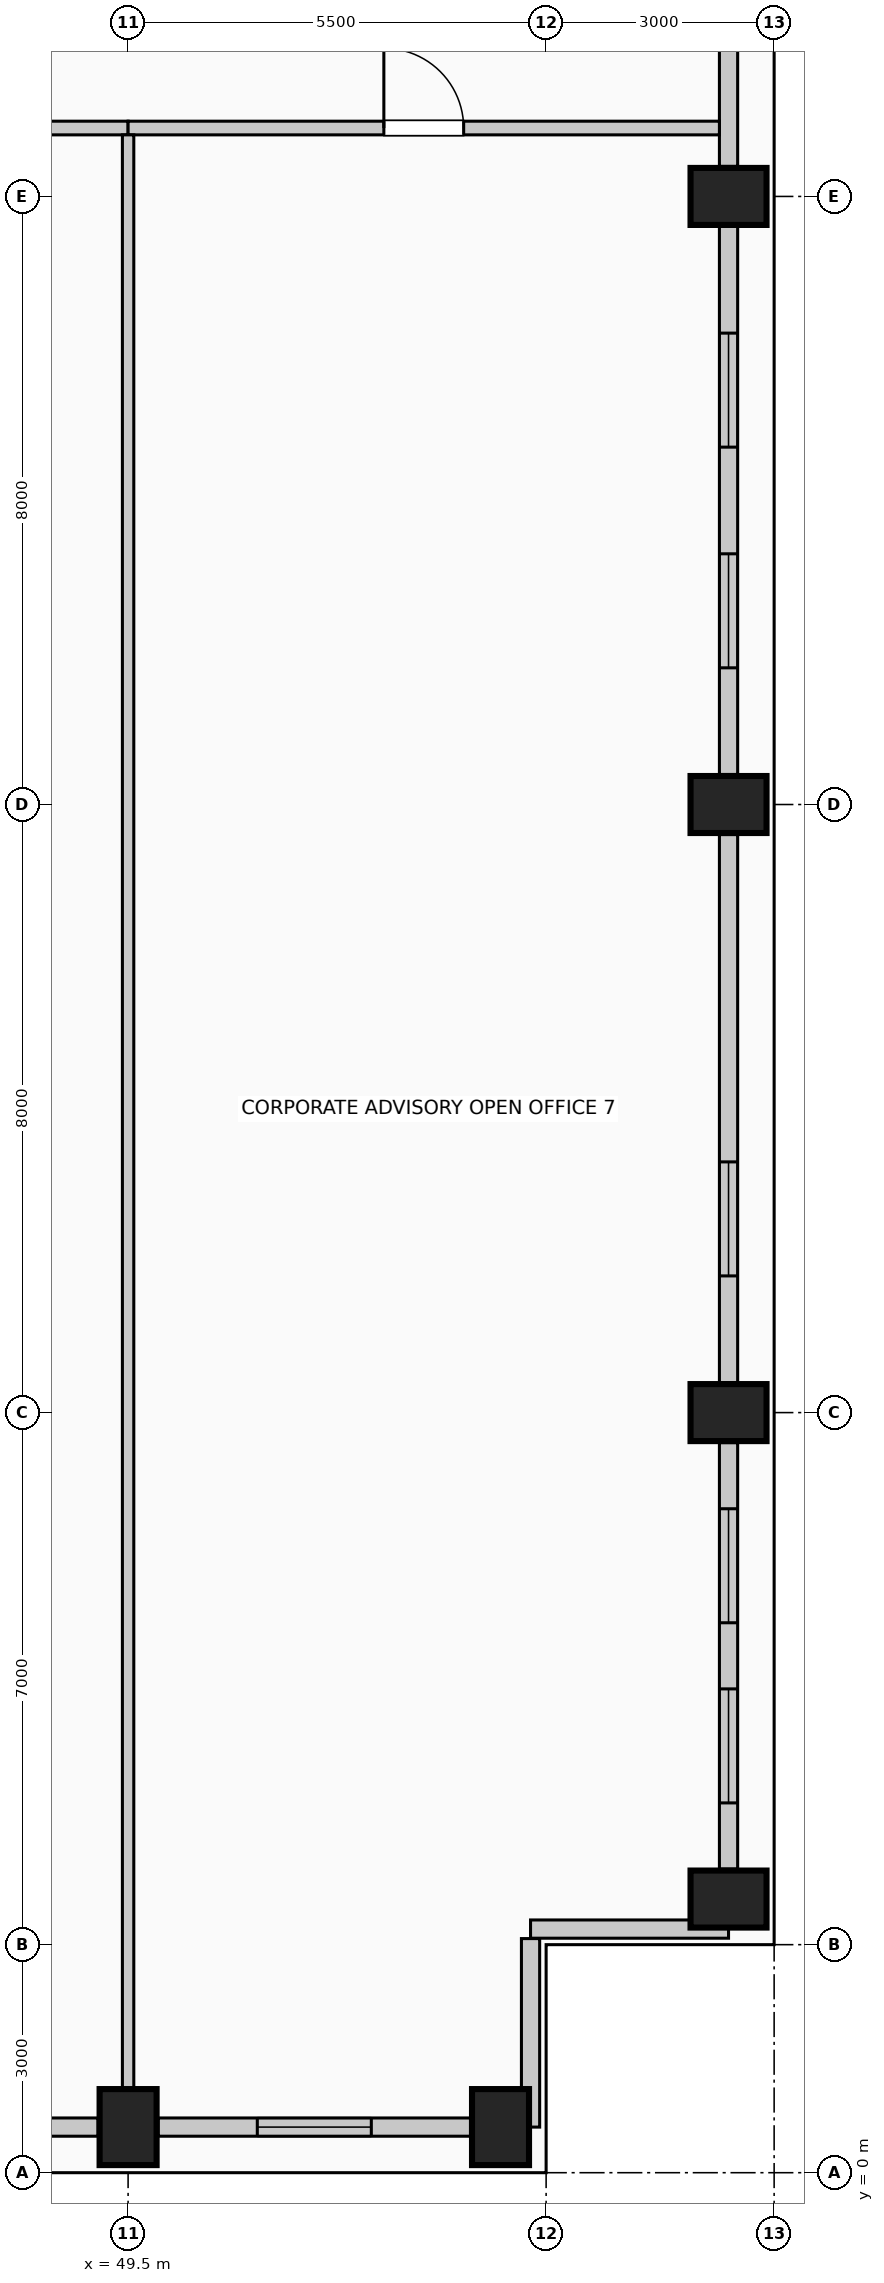
"""IFC4 building model, lengths in metres.
Left out: names, types, materials, properties, quantities, classifications, styles, units other than length and angle.
Written with IfcOpenShell. Run it as: python <this file> out.ifc"""

import sys

from ifc_helpers import new_model, si_unit, direction, frame, frame_2d, origin, origin_2d, place, context, subcontext, project, spatial, rectangle, extrude, element, fill, save


model = new_model("IFC4")
c1 = context("Model", 3, precision=1e-05, world=origin(), true_north=direction((0.0, 1.0)))
c2 = subcontext(c1, "Body", "Model", "MODEL_VIEW")
j1 = project(units=[si_unit("LENGTHUNIT", "METRE"), si_unit("PLANEANGLEUNIT", "RADIAN")], contexts=[c1])
p1 = place(None, origin())
s1 = spatial("IfcSite", under=j1, at=p1, CompositionType="ELEMENT")
p2 = place(p1, origin())
s2 = spatial("IfcBuilding", under=s1, at=p2, CompositionType="ELEMENT")
p3 = place(p2, frame((0.0, 0.0, 260.6)))
s3 = spatial("IfcBuildingStorey", under=s2, at=p3, CompositionType="ELEMENT", Elevation=260.6)
for number, where, z_axis, x_axis in (
    (1, (49.5, 0.6, 0.0), (0.0, 0.0, 1.0), (1.0, 0.0, 0.0)),
    (2, (54.4, 0.6, 0.0), (0.0, 0.0, 1.0), (1.0, 0.0, 0.0)),
    (3, (57.4, 3.6, 0.0), (0.0, 0.0, 1.0), (0.0, 1.0, 0.0)),
    (4, (57.4, 10.0, 0.0), (0.0, 0.0, 1.0), (0.0, 1.0, 0.0)),
    (5, (57.4, 18.0, 0.0), (0.0, 0.0, 1.0), (0.0, 1.0, 0.0)),
    (6, (57.4, 26.0, 0.0), (0.0, 0.0, 1.0), (0.0, 1.0, 0.0)),
):
    element("IfcColumn", number, at=place(p3, frame(where, z_axis=z_axis, x_axis=x_axis)), inside=s3, PredefinedType="COLUMN", context=c2, shape_type="SweptSolid", body=[
        extrude(rectangle(XDim=0.75, YDim=1.0, at=origin_2d()), origin(), (0.0, 0.0, 1.0), 4.0),
    ])
p4 = place(p3, frame((49.105, 0.6, 0.0), z_axis=(0.0, 0.0, 1.0), x_axis=(-1.0, 0.0, 0.0)))
e7 = element("IfcWall", 7, at=p4, inside=s3, PredefinedType="SOLIDWALL", context=c2, shape_type="SweptSolid", body=[
    extrude(rectangle(XDim=4.71, YDim=0.24, at=frame_2d((2.355, 0.0))), origin(), (0.0, 0.0, 1.0), 3.0),
])
p5 = place(p3, frame((54.005, 0.6, 0.0), z_axis=(0.0, 0.0, 1.0), x_axis=(-1.0, 0.0, 0.0)))
e8 = element("IfcWall", 8, at=p5, inside=s3, PredefinedType="SOLIDWALL", context=c2, shape_type="SweptSolid", body=[
    extrude(rectangle(XDim=4.11, YDim=0.24, at=frame_2d((2.055, 0.0))), origin(), (0.0, 0.0, 1.0), 3.0),
])
p6 = place(p5, frame((1.305, 0.0, 0.42)))
e9 = element("IfcOpeningElement", 9, at=p6, cuts=e8, PredefinedType="OPENING", context=c2, shape_type="SweptSolid", body=[
    extrude(rectangle(XDim=1.5, YDim=2.2, at=frame_2d((0.75, 1.1))), frame((0.0, 0.13, 0.0), z_axis=(0.0, -1.0, 0.0), x_axis=(1.0, 0.0, 0.0)), (0.0, 0.0, 1.0), 0.26),
])
p7 = place(p3, frame((57.4, 9.605, 0.0), z_axis=(0.0, 0.0, 1.0), x_axis=(0.0, -1.0, 0.0)))
e10 = element("IfcWall", 10, at=p7, inside=s3, PredefinedType="SOLIDWALL", context=c2, shape_type="SweptSolid", body=[
    extrude(rectangle(XDim=5.61, YDim=0.24, at=frame_2d((2.805, 0.0))), origin(), (0.0, 0.0, 1.0), 3.0),
])
p8 = place(p7, frame((0.87, 0.0, 0.42)))
e11 = element("IfcOpeningElement", 11, at=p8, cuts=e10, PredefinedType="OPENING", context=c2, shape_type="SweptSolid", body=[
    extrude(rectangle(XDim=1.5, YDim=2.2, at=frame_2d((0.75, 1.1))), frame((0.0, 0.13, 0.0), z_axis=(0.0, -1.0, 0.0), x_axis=(1.0, 0.0, 0.0)), (0.0, 0.0, 1.0), 0.26),
])
p9 = place(p7, frame((3.24, 0.0, 0.42)))
e12 = element("IfcOpeningElement", 12, at=p9, cuts=e10, PredefinedType="OPENING", context=c2, shape_type="SweptSolid", body=[
    extrude(rectangle(XDim=1.5, YDim=2.2, at=frame_2d((0.75, 1.1))), frame((0.0, 0.13, 0.0), z_axis=(0.0, -1.0, 0.0), x_axis=(1.0, 0.0, 0.0)), (0.0, 0.0, 1.0), 0.26),
])
p10 = place(p3, frame((57.4, 17.605, 0.0), z_axis=(0.0, 0.0, 1.0), x_axis=(0.0, -1.0, 0.0)))
e13 = element("IfcWall", 13, at=p10, inside=s3, PredefinedType="SOLIDWALL", context=c2, shape_type="SweptSolid", body=[
    extrude(rectangle(XDim=7.21, YDim=0.24, at=frame_2d((3.605, 0.0))), origin(), (0.0, 0.0, 1.0), 3.0),
])
p11 = place(p10, frame((4.307, 0.0, 0.42)))
e14 = element("IfcOpeningElement", 14, at=p11, cuts=e13, PredefinedType="OPENING", context=c2, shape_type="SweptSolid", body=[
    extrude(rectangle(XDim=1.5, YDim=2.2, at=frame_2d((0.75, 1.1))), frame((0.0, 0.13, 0.0), z_axis=(0.0, -1.0, 0.0), x_axis=(1.0, 0.0, 0.0)), (0.0, 0.0, 1.0), 0.26),
])
p12 = place(p3, frame((57.4, 25.605, 0.0), z_axis=(0.0, 0.0, 1.0), x_axis=(0.0, -1.0, 0.0)))
e15 = element("IfcWall", 15, at=p12, inside=s3, PredefinedType="SOLIDWALL", context=c2, shape_type="SweptSolid", body=[
    extrude(rectangle(XDim=7.21, YDim=0.24, at=frame_2d((3.605, 0.0))), origin(), (0.0, 0.0, 1.0), 3.0),
])
p13 = place(p12, frame((1.403, 0.0, 0.42)))
e16 = element("IfcOpeningElement", 16, at=p13, cuts=e15, PredefinedType="OPENING", context=c2, shape_type="SweptSolid", body=[
    extrude(rectangle(XDim=1.5, YDim=2.2, at=frame_2d((0.75, 1.1))), frame((0.0, 0.13, 0.0), z_axis=(0.0, -1.0, 0.0), x_axis=(1.0, 0.0, 0.0)), (0.0, 0.0, 1.0), 0.26),
])
p14 = place(p12, frame((4.307, 0.0, 0.42)))
e17 = element("IfcOpeningElement", 17, at=p14, cuts=e15, PredefinedType="OPENING", context=c2, shape_type="SweptSolid", body=[
    extrude(rectangle(XDim=1.5, YDim=2.2, at=frame_2d((0.75, 1.1))), frame((0.0, 0.13, 0.0), z_axis=(0.0, -1.0, 0.0), x_axis=(1.0, 0.0, 0.0)), (0.0, 0.0, 1.0), 0.26),
])
p15 = place(p3, frame((57.4, 33.605, 0.0), z_axis=(0.0, 0.0, 1.0), x_axis=(0.0, -1.0, 0.0)))
e18 = element("IfcWall", 18, at=p15, inside=s3, PredefinedType="SOLIDWALL", context=c2, shape_type="SweptSolid", body=[
    extrude(rectangle(XDim=7.21, YDim=0.24, at=frame_2d((3.605, 0.0))), origin(), (0.0, 0.0, 1.0), 3.0),
])
p16 = place(p3, frame((57.4, 3.205, 0.0), z_axis=(0.0, 0.0, 1.0), x_axis=(-1.0, 0.0, 0.0)))
e19 = element("IfcWall", 19, at=p16, inside=s3, PredefinedType="SOLIDWALL", context=c2, shape_type="SweptSolid", body=[
    extrude(rectangle(XDim=2.605, YDim=0.24, at=frame_2d((1.302, 0.0))), origin(), (0.0, 0.0, 1.0), 3.75),
])
p17 = place(p3, frame((54.795, 3.08, 0.0), z_axis=(0.0, 0.0, 1.0), x_axis=(0.0, -1.0, 0.0)))
e20 = element("IfcWall", 20, at=p17, inside=s3, PredefinedType="SOLIDWALL", context=c2, shape_type="SweptSolid", body=[
    extrude(rectangle(XDim=2.48, YDim=0.24, at=frame_2d((1.24, 0.0))), origin(), (0.0, 0.0, 1.0), 3.75),
])
p18 = place(p3, frame((39.52, 26.9, 0.0), z_axis=(0.0, 0.0, 1.0), x_axis=(1.0, 0.0, 0.0)))
e21 = element("IfcWall", 21, at=p18, inside=s3, PredefinedType="PARTITIONING", context=c2, shape_type="SweptSolid", body=[
    extrude(rectangle(XDim=9.98, YDim=0.18, at=frame_2d((4.99, 0.0))), origin(), (0.0, 0.0, 1.0), 3.75),
])
p19 = place(p18, frame((4.515, 0.0, 0.0)))
e22 = element("IfcOpeningElement", 22, at=p19, cuts=e21, PredefinedType="OPENING", context=c2, shape_type="SweptSolid", body=[
    extrude(rectangle(XDim=0.95, YDim=2.15, at=frame_2d((0.475, 1.075))), frame((0.0, 0.1, 0.0), z_axis=(0.0, -1.0, 0.0), x_axis=(1.0, 0.0, 0.0)), (0.0, 0.0, 1.0), 0.2),
])
p20 = place(p3, frame((49.5, 26.9, 0.0), z_axis=(0.0, 0.0, 1.0), x_axis=(1.0, 0.0, 0.0)))
e23 = element("IfcWall", 23, at=p20, inside=s3, PredefinedType="PARTITIONING", context=c2, shape_type="SweptSolid", body=[
    extrude(rectangle(XDim=7.78, YDim=0.18, at=frame_2d((3.89, 0.0))), origin(), (0.0, 0.0, 1.0), 3.75),
])
p21 = place(p20, frame((3.365, 0.0, 0.0)))
e24 = element("IfcOpeningElement", 24, at=p21, cuts=e23, PredefinedType="OPENING", context=c2, shape_type="SweptSolid", body=[
    extrude(rectangle(XDim=1.05, YDim=2.15, at=frame_2d((0.525, 1.075))), frame((0.0, 0.1, 0.0), z_axis=(0.0, -1.0, 0.0), x_axis=(1.0, 0.0, 0.0)), (0.0, 0.0, 1.0), 0.2),
])
p22 = place(p3, frame((49.5, 1.1, 0.0), z_axis=(0.0, 0.0, 1.0), x_axis=(0.0, 1.0, 0.0)))
e25 = element("IfcWall", 25, at=p22, inside=s3, PredefinedType="PARTITIONING", context=c2, shape_type="SweptSolid", body=[
    extrude(rectangle(XDim=25.71, YDim=0.15, at=frame_2d((12.855, 0.0))), origin(), (0.0, 0.0, 1.0), 3.75),
])
p23 = place(p6, origin())
e26 = element("IfcWindow", 26, at=p23, inside=s3, PartitioningType="SINGLE_PANEL", PredefinedType="WINDOW", context=c2, shape_type="SweptSolid", body=[
    extrude(rectangle(XDim=1.5, YDim=2.2, at=frame_2d((0.75, 1.1))), frame((0.0, 0.03, 0.0), z_axis=(0.0, -1.0, 0.0), x_axis=(1.0, 0.0, 0.0)), (0.0, 0.0, 1.0), 0.06),
])
fill(e9, e26)
p24 = place(p8, origin())
e27 = element("IfcWindow", 27, at=p24, inside=s3, PartitioningType="SINGLE_PANEL", PredefinedType="WINDOW", context=c2, shape_type="SweptSolid", body=[
    extrude(rectangle(XDim=1.5, YDim=2.2, at=frame_2d((0.75, 1.1))), frame((0.0, 0.03, 0.0), z_axis=(0.0, -1.0, 0.0), x_axis=(1.0, 0.0, 0.0)), (0.0, 0.0, 1.0), 0.06),
])
fill(e11, e27)
p25 = place(p9, origin())
e28 = element("IfcWindow", 28, at=p25, inside=s3, PartitioningType="SINGLE_PANEL", PredefinedType="WINDOW", context=c2, shape_type="SweptSolid", body=[
    extrude(rectangle(XDim=1.5, YDim=2.2, at=frame_2d((0.75, 1.1))), frame((0.0, 0.03, 0.0), z_axis=(0.0, -1.0, 0.0), x_axis=(1.0, 0.0, 0.0)), (0.0, 0.0, 1.0), 0.06),
])
fill(e12, e28)
p26 = place(p11, origin())
e29 = element("IfcWindow", 29, at=p26, inside=s3, PartitioningType="SINGLE_PANEL", PredefinedType="WINDOW", context=c2, shape_type="SweptSolid", body=[
    extrude(rectangle(XDim=1.5, YDim=2.2, at=frame_2d((0.75, 1.1))), frame((0.0, 0.03, 0.0), z_axis=(0.0, -1.0, 0.0), x_axis=(1.0, 0.0, 0.0)), (0.0, 0.0, 1.0), 0.06),
])
fill(e14, e29)
p27 = place(p13, origin())
e30 = element("IfcWindow", 30, at=p27, inside=s3, PartitioningType="SINGLE_PANEL", PredefinedType="WINDOW", context=c2, shape_type="SweptSolid", body=[
    extrude(rectangle(XDim=1.5, YDim=2.2, at=frame_2d((0.75, 1.1))), frame((0.0, 0.03, 0.0), z_axis=(0.0, -1.0, 0.0), x_axis=(1.0, 0.0, 0.0)), (0.0, 0.0, 1.0), 0.06),
])
fill(e16, e30)
p28 = place(p14, origin())
e31 = element("IfcWindow", 31, at=p28, inside=s3, PartitioningType="SINGLE_PANEL", PredefinedType="WINDOW", context=c2, shape_type="SweptSolid", body=[
    extrude(rectangle(XDim=1.5, YDim=2.2, at=frame_2d((0.75, 1.1))), frame((0.0, 0.03, 0.0), z_axis=(0.0, -1.0, 0.0), x_axis=(1.0, 0.0, 0.0)), (0.0, 0.0, 1.0), 0.06),
])
fill(e17, e31)
p29 = place(p21, origin())
e32 = element("IfcDoor", 32, at=p29, inside=s3, OperationType="SINGLE_SWING_LEFT", PredefinedType="DOOR", context=c2, shape_type="SweptSolid", body=[
    extrude(rectangle(XDim=1.05, YDim=2.15, at=frame_2d((0.525, 1.075))), frame((0.0, 0.025, 0.0), z_axis=(0.0, -1.0, 0.0), x_axis=(1.0, 0.0, 0.0)), (0.0, 0.0, 1.0), 0.05),
])
fill(e24, e32)
save(model, sys.argv[1])
